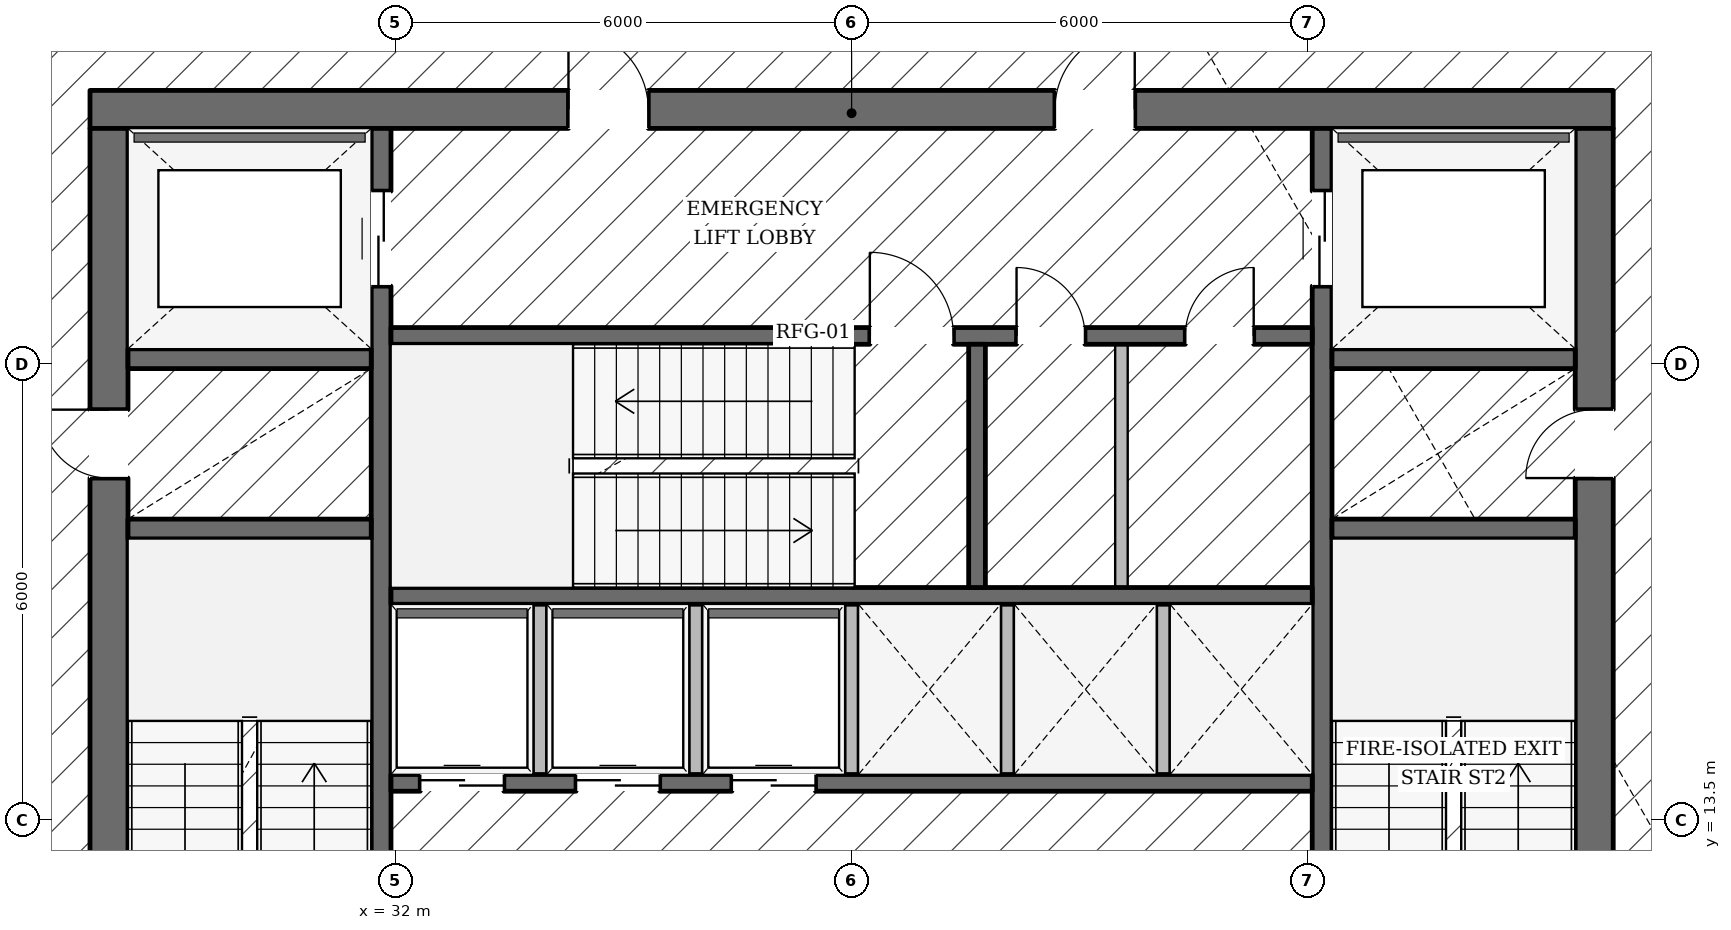
"""IFC4 building model, lengths in metres.
Left out: names, types, materials, properties, quantities, classifications, styles, units other than length and angle.
Written with IfcOpenShell. Run it as: python <this file> out.ifc"""

import sys

from ifc_helpers import new_model, si_unit, direction, frame, frame_2d, origin, place, context, subcontext, project, spatial, rectangle, extrude, element, fill, save


model = new_model("IFC4")
c1 = context("Model", 3, precision=1e-05, world=origin(), true_north=direction((0.0, 1.0)))
c2 = subcontext(c1, "Body", "Model", "MODEL_VIEW")
j1 = project(units=[si_unit("LENGTHUNIT", "METRE"), si_unit("PLANEANGLEUNIT", "RADIAN")], contexts=[c1])
p1 = place(None, origin())
s1 = spatial("IfcSite", under=j1, at=p1, CompositionType="ELEMENT")
p2 = place(p1, origin())
s2 = spatial("IfcBuilding", under=s1, at=p2, CompositionType="ELEMENT")
p3 = place(p2, frame((0.0, 0.0, 75.3)))
s3 = spatial("IfcBuildingStorey", under=s2, at=p3, CompositionType="ELEMENT", Elevation=75.3)
p4 = place(p3, frame((27.98, 22.85, 0.0), z_axis=(0.0, 0.0, 1.0), x_axis=(1.0, 0.0, 0.0)))
e1 = element("IfcWall", 1, at=p4, inside=s3, PredefinedType="SOLIDWALL", context=c2, shape_type="SweptSolid", body=[
    extrude(rectangle(XDim=20.04, YDim=0.5, at=frame_2d((10.02, 0.0))), origin(), (0.0, 0.0, 1.0), 4.985),
])
p5 = place(p4, frame((6.295, 0.0, 0.0)))
e2 = element("IfcOpeningElement", 2, at=p5, cuts=e1, PredefinedType="OPENING", context=c2, shape_type="SweptSolid", body=[
    extrude(rectangle(XDim=1.05, YDim=2.15, at=frame_2d((0.525, 1.075))), frame((0.0, 0.26, 0.0), z_axis=(0.0, -1.0, 0.0), x_axis=(1.0, 0.0, 0.0)), (0.0, 0.0, 1.0), 0.52),
])
p6 = place(p4, frame((12.695, 0.0, 0.0)))
e3 = element("IfcOpeningElement", 3, at=p6, cuts=e1, PredefinedType="OPENING", context=c2, shape_type="SweptSolid", body=[
    extrude(rectangle(XDim=1.05, YDim=2.15, at=frame_2d((0.525, 1.075))), frame((0.0, 0.26, 0.0), z_axis=(0.0, -1.0, 0.0), x_axis=(1.0, 0.0, 0.0)), (0.0, 0.0, 1.0), 0.52),
])
p7 = place(p3, frame((28.23, 9.6, 0.0), z_axis=(0.0, 0.0, 1.0), x_axis=(0.0, 1.0, 0.0)))
e4 = element("IfcWall", 4, at=p7, inside=s3, PredefinedType="SOLIDWALL", context=c2, shape_type="SweptSolid", body=[
    extrude(rectangle(XDim=13.0, YDim=0.5, at=frame_2d((6.5, 0.0))), origin(), (0.0, 0.0, 1.0), 4.985),
])
p8 = place(p7, frame((0.2, 0.0, 0.0)))
e5 = element("IfcOpeningElement", 5, at=p8, cuts=e4, PredefinedType="OPENING", context=c2, shape_type="SweptSolid", body=[
    extrude(rectangle(XDim=1.1, YDim=2.15, at=frame_2d((0.55, 1.075))), frame((0.0, 0.26, 0.0), z_axis=(0.0, -1.0, 0.0), x_axis=(1.0, 0.0, 0.0)), (0.0, 0.0, 1.0), 0.52),
])
p9 = place(p7, frame((8.4, 0.0, 0.0)))
e6 = element("IfcOpeningElement", 6, at=p9, cuts=e4, PredefinedType="OPENING", context=c2, shape_type="SweptSolid", body=[
    extrude(rectangle(XDim=0.9, YDim=2.1, at=frame_2d((0.45, 1.05))), frame((0.0, 0.26, 0.0), z_axis=(0.0, -1.0, 0.0), x_axis=(1.0, 0.0, 0.0)), (0.0, 0.0, 1.0), 0.52),
])
p10 = place(p3, frame((47.77, 9.6, 0.0), z_axis=(0.0, 0.0, 1.0), x_axis=(0.0, 1.0, 0.0)))
e7 = element("IfcWall", 7, at=p10, inside=s3, PredefinedType="SOLIDWALL", context=c2, shape_type="SweptSolid", body=[
    extrude(rectangle(XDim=13.0, YDim=0.5, at=frame_2d((6.5, 0.0))), origin(), (0.0, 0.0, 1.0), 4.985),
])
p11 = place(p10, frame((0.2, 0.0, 0.0)))
e8 = element("IfcOpeningElement", 8, at=p11, cuts=e7, PredefinedType="OPENING", context=c2, shape_type="SweptSolid", body=[
    extrude(rectangle(XDim=1.1, YDim=2.15, at=frame_2d((0.55, 1.075))), frame((0.0, 0.26, 0.0), z_axis=(0.0, -1.0, 0.0), x_axis=(1.0, 0.0, 0.0)), (0.0, 0.0, 1.0), 0.52),
])
p12 = place(p10, frame((8.4, 0.0, 0.0)))
e9 = element("IfcOpeningElement", 9, at=p12, cuts=e7, PredefinedType="OPENING", context=c2, shape_type="SweptSolid", body=[
    extrude(rectangle(XDim=0.9, YDim=2.1, at=frame_2d((0.45, 1.05))), frame((0.0, 0.26, 0.0), z_axis=(0.0, -1.0, 0.0), x_axis=(1.0, 0.0, 0.0)), (0.0, 0.0, 1.0), 0.52),
])
p13 = place(p3, frame((31.81, 9.6, 0.0), z_axis=(0.0, 0.0, 1.0), x_axis=(0.0, 1.0, 0.0)))
e10 = element("IfcWall", 10, at=p13, inside=s3, PredefinedType="SHEAR", context=c2, shape_type="SweptSolid", body=[
    extrude(rectangle(XDim=13.0, YDim=0.26, at=frame_2d((6.5, 0.0))), origin(), (0.0, 0.0, 1.0), 4.985),
])
p14 = place(p13, frame((10.925, 0.0, 0.0)))
e11 = element("IfcOpeningElement", 11, at=p14, cuts=e10, PredefinedType="OPENING", context=c2, shape_type="SweptSolid", body=[
    extrude(rectangle(XDim=1.25, YDim=2.25, at=frame_2d((0.625, 1.125))), frame((0.0, 0.14, 0.0), z_axis=(0.0, -1.0, 0.0), x_axis=(1.0, 0.0, 0.0)), (0.0, 0.0, 1.0), 0.28),
])
p15 = place(p3, frame((44.19, 9.6, 0.0), z_axis=(0.0, 0.0, 1.0), x_axis=(0.0, 1.0, 0.0)))
e12 = element("IfcWall", 12, at=p15, inside=s3, PredefinedType="SHEAR", context=c2, shape_type="SweptSolid", body=[
    extrude(rectangle(XDim=13.0, YDim=0.26, at=frame_2d((6.5, 0.0))), origin(), (0.0, 0.0, 1.0), 4.985),
])
p16 = place(p15, frame((10.925, 0.0, 0.0)))
e13 = element("IfcOpeningElement", 13, at=p16, cuts=e12, PredefinedType="OPENING", context=c2, shape_type="SweptSolid", body=[
    extrude(rectangle(XDim=1.25, YDim=2.25, at=frame_2d((0.625, 1.125))), frame((0.0, 0.14, 0.0), z_axis=(0.0, -1.0, 0.0), x_axis=(1.0, 0.0, 0.0)), (0.0, 0.0, 1.0), 0.28),
])
for number, where, z_axis, x_axis in (
    (14, (28.48, 17.33, 0.0), (0.0, 0.0, 1.0), (1.0, 0.0, 0.0)),
    (15, (28.48, 19.57, 0.0), (0.0, 0.0, 1.0), (1.0, 0.0, 0.0)),
    (16, (44.32, 17.33, 0.0), (0.0, 0.0, 1.0), (1.0, 0.0, 0.0)),
    (17, (44.32, 19.57, 0.0), (0.0, 0.0, 1.0), (1.0, 0.0, 0.0)),
):
    element("IfcWall", number, at=place(p3, frame(where, z_axis=z_axis, x_axis=x_axis)), inside=s3, PredefinedType="SHEAR", context=c2, shape_type="SweptSolid", body=[
        extrude(rectangle(XDim=3.2, YDim=0.26, at=frame_2d((1.6, 0.0))), origin(), (0.0, 0.0, 1.0), 4.985),
    ])
p17 = place(p3, frame((31.94, 19.87, 0.0), z_axis=(0.0, 0.0, 1.0), x_axis=(1.0, 0.0, 0.0)))
e18 = element("IfcWall", 18, at=p17, inside=s3, PredefinedType="SOLIDWALL", context=c2, shape_type="SweptSolid", body=[
    extrude(rectangle(XDim=12.12, YDim=0.22, at=frame_2d((6.06, 0.0))), origin(), (0.0, 0.0, 1.0), 4.985),
])
p18 = place(p17, frame((6.3, 0.0, 0.0)))
e19 = element("IfcOpeningElement", 19, at=p18, cuts=e18, PredefinedType="OPENING", context=c2, shape_type="SweptSolid", body=[
    extrude(rectangle(XDim=1.1, YDim=2.15, at=frame_2d((0.55, 1.075))), frame((0.0, 0.12, 0.0), z_axis=(0.0, -1.0, 0.0), x_axis=(1.0, 0.0, 0.0)), (0.0, 0.0, 1.0), 0.24),
])
p19 = place(p17, frame((8.23, 0.0, 0.0)))
e20 = element("IfcOpeningElement", 20, at=p19, cuts=e18, PredefinedType="OPENING", context=c2, shape_type="SweptSolid", body=[
    extrude(rectangle(XDim=0.9, YDim=2.1, at=frame_2d((0.45, 1.05))), frame((0.0, 0.12, 0.0), z_axis=(0.0, -1.0, 0.0), x_axis=(1.0, 0.0, 0.0)), (0.0, 0.0, 1.0), 0.24),
])
p20 = place(p17, frame((10.45, 0.0, 0.0)))
e21 = element("IfcOpeningElement", 21, at=p20, cuts=e18, PredefinedType="OPENING", context=c2, shape_type="SweptSolid", body=[
    extrude(rectangle(XDim=0.9, YDim=2.1, at=frame_2d((0.45, 1.05))), frame((0.0, 0.12, 0.0), z_axis=(0.0, -1.0, 0.0), x_axis=(1.0, 0.0, 0.0)), (0.0, 0.0, 1.0), 0.24),
])
p21 = place(p3, frame((31.94, 16.45, 0.0), z_axis=(0.0, 0.0, 1.0), x_axis=(1.0, 0.0, 0.0)))
e22 = element("IfcWall", 22, at=p21, inside=s3, PredefinedType="SOLIDWALL", context=c2, shape_type="SweptSolid", body=[
    extrude(rectangle(XDim=12.12, YDim=0.22, at=frame_2d((6.06, 0.0))), origin(), (0.0, 0.0, 1.0), 4.985),
])
p22 = place(p3, frame((39.65, 16.56, 0.0), z_axis=(0.0, 0.0, 1.0), x_axis=(0.0, 1.0, 0.0)))
e23 = element("IfcWall", 23, at=p22, inside=s3, PredefinedType="SOLIDWALL", context=c2, shape_type="SweptSolid", body=[
    extrude(rectangle(XDim=3.2, YDim=0.22, at=frame_2d((1.6, 0.0))), origin(), (0.0, 0.0, 1.0), 4.985),
])
p23 = place(p3, frame((31.94, 13.99, 0.0), z_axis=(0.0, 0.0, 1.0), x_axis=(1.0, 0.0, 0.0)))
e24 = element("IfcWall", 24, at=p23, inside=s3, PredefinedType="SOLIDWALL", context=c2, shape_type="SweptSolid", body=[
    extrude(rectangle(XDim=12.12, YDim=0.22, at=frame_2d((6.06, 0.0))), origin(), (0.0, 0.0, 1.0), 4.985),
])
p24 = place(p23, frame((0.385, 0.0, 0.0)))
e25 = element("IfcOpeningElement", 25, at=p24, cuts=e24, PredefinedType="OPENING", context=c2, shape_type="SweptSolid", body=[
    extrude(rectangle(XDim=1.1, YDim=2.2, at=frame_2d((0.55, 1.1))), frame((0.0, 0.12, 0.0), z_axis=(0.0, -1.0, 0.0), x_axis=(1.0, 0.0, 0.0)), (0.0, 0.0, 1.0), 0.24),
])
p25 = place(p23, frame((2.435, 0.0, 0.0)))
e26 = element("IfcOpeningElement", 26, at=p25, cuts=e24, PredefinedType="OPENING", context=c2, shape_type="SweptSolid", body=[
    extrude(rectangle(XDim=1.1, YDim=2.2, at=frame_2d((0.55, 1.1))), frame((0.0, 0.12, 0.0), z_axis=(0.0, -1.0, 0.0), x_axis=(1.0, 0.0, 0.0)), (0.0, 0.0, 1.0), 0.24),
])
p26 = place(p23, frame((4.485, 0.0, 0.0)))
e27 = element("IfcOpeningElement", 27, at=p26, cuts=e24, PredefinedType="OPENING", context=c2, shape_type="SweptSolid", body=[
    extrude(rectangle(XDim=1.1, YDim=2.2, at=frame_2d((0.55, 1.1))), frame((0.0, 0.12, 0.0), z_axis=(0.0, -1.0, 0.0), x_axis=(1.0, 0.0, 0.0)), (0.0, 0.0, 1.0), 0.24),
])
p27 = place(p3, frame((13.665, 13.524, 0.0), z_axis=(0.0, 0.0, 1.0), x_axis=(0.50295003743, 0.864315486295, 0.0)))
e28 = element("IfcWall", 28, at=p27, inside=s3, PredefinedType="STANDARD", context=c2, shape_type="SweptSolid", body=[
    extrude(rectangle(XDim=35.184, YDim=0.32, at=frame_2d((17.592, 0.0))), origin(), (0.0, 0.0, 1.0), 3.677),
])
p28 = place(p3, frame((44.478, 44.029, 0.0), z_axis=(0.0, 0.0, 1.0), x_axis=(0.497006709314, -0.867746697428, 0.0)))
e29 = element("IfcWall", 29, at=p28, inside=s3, PredefinedType="STANDARD", context=c2, shape_type="SweptSolid", body=[
    extrude(rectangle(XDim=34.773, YDim=0.32, at=frame_2d((17.386, 0.0))), origin(), (0.0, 0.0, 1.0), 3.677),
])
p29 = place(p3, frame((30.821, 44.822, 0.0), z_axis=(0.0, 0.0, 1.0), x_axis=(-0.504421897802, -0.863457323218, 0.0)))
e30 = element("IfcWall", 30, at=p29, inside=s3, PredefinedType="PARAPET", context=c2, shape_type="SweptSolid", body=[
    extrude(rectangle(XDim=36.395, YDim=0.24, at=frame_2d((18.197, 0.0))), origin(), (0.0, 0.0, 1.0), 1.25),
])
p30 = place(p3, frame((63.012, 13.699, 0.0), z_axis=(0.0, 0.0, 1.0), x_axis=(-0.499261971682, 0.866451085539, 0.0)))
e31 = element("IfcWall", 31, at=p30, inside=s3, PredefinedType="PARAPET", context=c2, shape_type="SweptSolid", body=[
    extrude(rectangle(XDim=36.021, YDim=0.24, at=frame_2d((18.01, 0.0))), origin(), (0.0, 0.0, 1.0), 1.25),
])
for number, where, z_axis, x_axis in (
    (32, (33.9, 14.1, 0.0), (0.0, 0.0, 1.0), (0.0, 1.0, 0.0)),
    (33, (35.95, 14.1, 0.0), (0.0, 0.0, 1.0), (0.0, 1.0, 0.0)),
    (34, (38.0, 14.1, 0.0), (0.0, 0.0, 1.0), (0.0, 1.0, 0.0)),
    (35, (40.05, 14.1, 0.0), (0.0, 0.0, 1.0), (0.0, 1.0, 0.0)),
    (36, (42.1, 14.1, 0.0), (0.0, 0.0, 1.0), (0.0, 1.0, 0.0)),
):
    element("IfcWall", number, at=place(p3, frame(where, z_axis=z_axis, x_axis=x_axis)), inside=s3, PredefinedType="PARTITIONING", context=c2, shape_type="SweptSolid", body=[
        extrude(rectangle(XDim=2.24, YDim=0.165, at=frame_2d((1.12, 0.0))), origin(), (0.0, 0.0, 1.0), 4.985),
    ])
p31 = place(p3, frame((41.55, 16.56, 0.0), z_axis=(0.0, 0.0, 1.0), x_axis=(0.0, 1.0, 0.0)))
e37 = element("IfcWall", 37, at=p31, inside=s3, PredefinedType="PARTITIONING", context=c2, shape_type="SweptSolid", body=[
    extrude(rectangle(XDim=3.2, YDim=0.165, at=frame_2d((1.6, 0.0))), origin(), (0.0, 0.0, 1.0), 4.985),
])
p32 = place(p18, origin())
e38 = element("IfcDoor", 38, at=p32, inside=s3, OperationType="SINGLE_SWING_LEFT", PredefinedType="DOOR", context=c2, shape_type="SweptSolid", body=[
    extrude(rectangle(XDim=1.1, YDim=2.15, at=frame_2d((0.55, 1.075))), frame((0.0, 0.025, 0.0), z_axis=(0.0, -1.0, 0.0), x_axis=(1.0, 0.0, 0.0)), (0.0, 0.0, 1.0), 0.05),
])
fill(e19, e38)
p33 = place(p9, origin())
e39 = element("IfcDoor", 39, at=p33, inside=s3, OperationType="SINGLE_SWING_RIGHT", PredefinedType="DOOR", context=c2, shape_type="SweptSolid", body=[
    extrude(rectangle(XDim=0.9, YDim=2.1, at=frame_2d((0.45, 1.05))), frame((0.0, 0.025, 0.0), z_axis=(0.0, -1.0, 0.0), x_axis=(1.0, 0.0, 0.0)), (0.0, 0.0, 1.0), 0.05),
])
fill(e6, e39)
p34 = place(p12, origin())
e40 = element("IfcDoor", 40, at=p34, inside=s3, OperationType="SINGLE_SWING_LEFT", PredefinedType="DOOR", context=c2, shape_type="SweptSolid", body=[
    extrude(rectangle(XDim=0.9, YDim=2.1, at=frame_2d((0.45, 1.05))), frame((0.0, 0.025, 0.0), z_axis=(0.0, -1.0, 0.0), x_axis=(1.0, 0.0, 0.0)), (0.0, 0.0, 1.0), 0.05),
])
fill(e9, e40)
p35 = place(p5, origin())
e41 = element("IfcDoor", 41, at=p35, inside=s3, OperationType="SINGLE_SWING_LEFT", PredefinedType="DOOR", context=c2, shape_type="SweptSolid", body=[
    extrude(rectangle(XDim=1.05, YDim=2.15, at=frame_2d((0.525, 1.075))), frame((0.0, 0.025, 0.0), z_axis=(0.0, -1.0, 0.0), x_axis=(1.0, 0.0, 0.0)), (0.0, 0.0, 1.0), 0.05),
])
fill(e2, e41)
p36 = place(p6, origin())
e42 = element("IfcDoor", 42, at=p36, inside=s3, OperationType="SINGLE_SWING_RIGHT", PredefinedType="DOOR", context=c2, shape_type="SweptSolid", body=[
    extrude(rectangle(XDim=1.05, YDim=2.15, at=frame_2d((0.525, 1.075))), frame((0.0, 0.025, 0.0), z_axis=(0.0, -1.0, 0.0), x_axis=(1.0, 0.0, 0.0)), (0.0, 0.0, 1.0), 0.05),
])
fill(e3, e42)
p37 = place(p14, origin())
e43 = element("IfcDoor", 43, at=p37, inside=s3, OperationType="DOUBLE_DOOR_SLIDING", PredefinedType="DOOR", context=c2, shape_type="SweptSolid", body=[
    extrude(rectangle(XDim=1.25, YDim=2.25, at=frame_2d((0.625, 1.125))), frame((0.0, 0.025, 0.0), z_axis=(0.0, -1.0, 0.0), x_axis=(1.0, 0.0, 0.0)), (0.0, 0.0, 1.0), 0.05),
])
fill(e11, e43)
p38 = place(p16, origin())
e44 = element("IfcDoor", 44, at=p38, inside=s3, OperationType="DOUBLE_DOOR_SLIDING", PredefinedType="DOOR", context=c2, shape_type="SweptSolid", body=[
    extrude(rectangle(XDim=1.25, YDim=2.25, at=frame_2d((0.625, 1.125))), frame((0.0, 0.025, 0.0), z_axis=(0.0, -1.0, 0.0), x_axis=(1.0, 0.0, 0.0)), (0.0, 0.0, 1.0), 0.05),
])
fill(e13, e44)
p39 = place(p24, origin())
e45 = element("IfcDoor", 45, at=p39, inside=s3, OperationType="DOUBLE_DOOR_SLIDING", PredefinedType="DOOR", context=c2, shape_type="SweptSolid", body=[
    extrude(rectangle(XDim=1.1, YDim=2.2, at=frame_2d((0.55, 1.1))), frame((0.0, 0.025, 0.0), z_axis=(0.0, -1.0, 0.0), x_axis=(1.0, 0.0, 0.0)), (0.0, 0.0, 1.0), 0.05),
])
fill(e25, e45)
p40 = place(p25, origin())
e46 = element("IfcDoor", 46, at=p40, inside=s3, OperationType="DOUBLE_DOOR_SLIDING", PredefinedType="DOOR", context=c2, shape_type="SweptSolid", body=[
    extrude(rectangle(XDim=1.1, YDim=2.2, at=frame_2d((0.55, 1.1))), frame((0.0, 0.025, 0.0), z_axis=(0.0, -1.0, 0.0), x_axis=(1.0, 0.0, 0.0)), (0.0, 0.0, 1.0), 0.05),
])
fill(e26, e46)
p41 = place(p26, origin())
e47 = element("IfcDoor", 47, at=p41, inside=s3, OperationType="DOUBLE_DOOR_SLIDING", PredefinedType="DOOR", context=c2, shape_type="SweptSolid", body=[
    extrude(rectangle(XDim=1.1, YDim=2.2, at=frame_2d((0.55, 1.1))), frame((0.0, 0.025, 0.0), z_axis=(0.0, -1.0, 0.0), x_axis=(1.0, 0.0, 0.0)), (0.0, 0.0, 1.0), 0.05),
])
fill(e27, e47)
p42 = place(p19, origin())
e48 = element("IfcDoor", 48, at=p42, inside=s3, OperationType="SINGLE_SWING_LEFT", PredefinedType="DOOR", context=c2, shape_type="SweptSolid", body=[
    extrude(rectangle(XDim=0.9, YDim=2.1, at=frame_2d((0.45, 1.05))), frame((0.0, 0.025, 0.0), z_axis=(0.0, -1.0, 0.0), x_axis=(1.0, 0.0, 0.0)), (0.0, 0.0, 1.0), 0.05),
])
fill(e20, e48)
p43 = place(p20, origin())
e49 = element("IfcDoor", 49, at=p43, inside=s3, OperationType="SINGLE_SWING_RIGHT", PredefinedType="DOOR", context=c2, shape_type="SweptSolid", body=[
    extrude(rectangle(XDim=0.9, YDim=2.1, at=frame_2d((0.45, 1.05))), frame((0.0, 0.025, 0.0), z_axis=(0.0, -1.0, 0.0), x_axis=(1.0, 0.0, 0.0)), (0.0, 0.0, 1.0), 0.05),
])
fill(e21, e49)
save(model, sys.argv[1])
